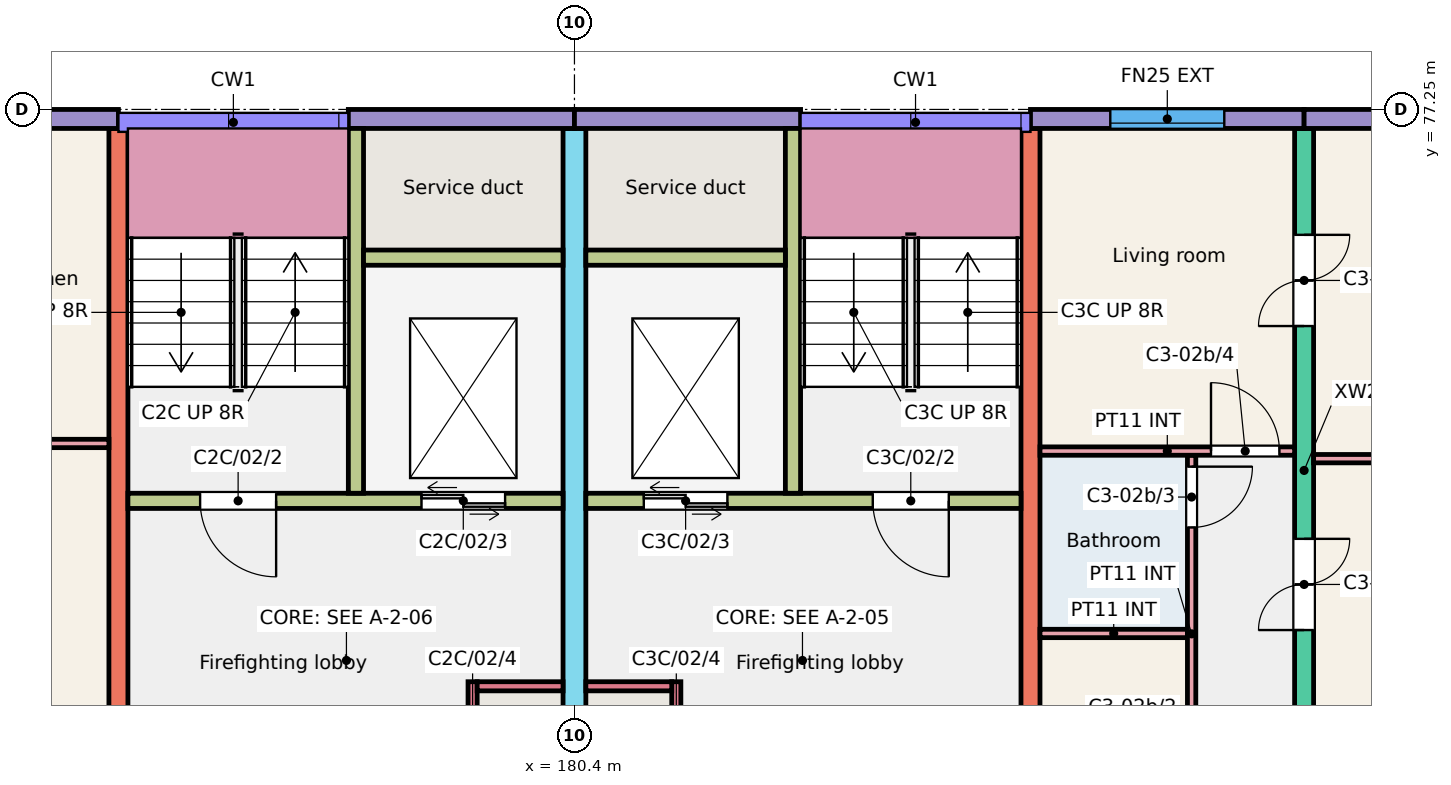
"""IFC4 building model, lengths in metres.
Left out: names, types, materials, properties, quantities, classifications, styles, units other than length and angle.
Written with IfcOpenShell. Run it as: python <this file> out.ifc"""

import sys

from ifc_helpers import new_model, si_unit, direction, frame, frame_2d, origin, place, context, subcontext, project, spatial, rectangle, extrude, element, fill, save


model = new_model("IFC4")
c1 = context("Model", 3, precision=1e-05, world=origin(), true_north=direction((0.0, 1.0)))
c2 = subcontext(c1, "Body", "Model", "MODEL_VIEW")
j1 = project(units=[si_unit("LENGTHUNIT", "METRE"), si_unit("PLANEANGLEUNIT", "RADIAN")], contexts=[c1])
p1 = place(None, origin())
s1 = spatial("IfcSite", under=j1, at=p1, CompositionType="ELEMENT")
p2 = place(p1, origin())
s2 = spatial("IfcBuilding", under=s1, at=p2, CompositionType="ELEMENT")
p3 = place(p2, frame((0.0, 0.0, 6.0)))
s3 = spatial("IfcBuildingStorey", under=s2, at=p3, CompositionType="ELEMENT", Elevation=6.0)
p4 = place(p3, frame((174.4, 68.0, 0.0), z_axis=(0.0, 0.0, 1.0), x_axis=(0.0, 1.0, 0.0)))
e1 = element("IfcWall", 1, at=p4, inside=s3, PredefinedType="SHEAR", context=c2, shape_type="SweptSolid", body=[
    extrude(rectangle(XDim=9.0, YDim=0.25, at=frame_2d((4.5, 0.0))), origin(), (0.0, 0.0, 1.0), 3.0),
])
p5 = place(p3, frame((180.4, 66.0, 0.0), z_axis=(0.0, 0.0, 1.0), x_axis=(0.0, 1.0, 0.0)))
e2 = element("IfcWall", 2, at=p5, inside=s3, PredefinedType="SHEAR", context=c2, shape_type="SweptSolid", body=[
    extrude(rectangle(XDim=11.0, YDim=0.3, at=frame_2d((5.5, 0.0))), origin(), (0.0, 0.0, 1.0), 3.0),
])
p6 = place(p5, frame((0.3, 0.0, 0.0)))
e3 = element("IfcOpeningElement", 3, at=p6, cuts=e2, PredefinedType="OPENING", context=c2, shape_type="SweptSolid", body=[
    extrude(rectangle(XDim=1.2, YDim=2.1, at=frame_2d((0.6, 1.05))), frame((0.0, 0.16, 0.0), z_axis=(0.0, -1.0, 0.0), x_axis=(1.0, 0.0, 0.0)), (0.0, 0.0, 1.0), 0.32),
])
p7 = place(p3, frame((186.4, 68.0, 0.0), z_axis=(0.0, 0.0, 1.0), x_axis=(0.0, 1.0, 0.0)))
e4 = element("IfcWall", 4, at=p7, inside=s3, PredefinedType="SHEAR", context=c2, shape_type="SweptSolid", body=[
    extrude(rectangle(XDim=9.0, YDim=0.25, at=frame_2d((4.5, 0.0))), origin(), (0.0, 0.0, 1.0), 3.0),
])
p8 = place(p3, frame((190.0, 68.0, 0.0), z_axis=(0.0, 0.0, 1.0), x_axis=(0.0, 1.0, 0.0)))
e5 = element("IfcWall", 5, at=p8, inside=s3, PredefinedType="SHEAR", context=c2, shape_type="SweptSolid", body=[
    extrude(rectangle(XDim=9.0, YDim=0.25, at=frame_2d((4.5, 0.0))), origin(), (0.0, 0.0, 1.0), 3.0),
])
p9 = place(p8, frame((2.4, 0.0, 0.0)))
e6 = element("IfcOpeningElement", 6, at=p9, cuts=e5, PredefinedType="OPENING", context=c2, shape_type="SweptSolid", body=[
    extrude(rectangle(XDim=1.2, YDim=2.1, at=frame_2d((0.6, 1.05))), frame((0.0, 0.135, 0.0), z_axis=(0.0, -1.0, 0.0), x_axis=(1.0, 0.0, 0.0)), (0.0, 0.0, 1.0), 0.27),
])
p10 = place(p8, frame((6.4, 0.0, 0.0)))
e7 = element("IfcOpeningElement", 7, at=p10, cuts=e5, PredefinedType="OPENING", context=c2, shape_type="SweptSolid", body=[
    extrude(rectangle(XDim=1.2, YDim=2.1, at=frame_2d((0.6, 1.05))), frame((0.0, 0.135, 0.0), z_axis=(0.0, -1.0, 0.0), x_axis=(1.0, 0.0, 0.0)), (0.0, 0.0, 1.0), 0.27),
])
p11 = place(p3, frame((170.8, 77.125, 0.0), z_axis=(0.0, 0.0, 1.0), x_axis=(1.0, 0.0, 0.0)))
e8 = element("IfcWall", 8, at=p11, inside=s3, PredefinedType="SOLIDWALL", context=c2, shape_type="SweptSolid", body=[
    extrude(rectangle(XDim=3.6, YDim=0.25, at=frame_2d((1.8, 0.0))), origin(), (0.0, 0.0, 1.0), 3.0),
])
p12 = place(p11, frame((1.188, 0.0, 1.1)))
e9 = element("IfcOpeningElement", 9, at=p12, cuts=e8, PredefinedType="OPENING", context=c2, shape_type="SweptSolid", body=[
    extrude(rectangle(XDim=1.2, YDim=1.3, at=frame_2d((0.6, 0.65))), frame((0.0, 0.135, 0.0), z_axis=(0.0, -1.0, 0.0), x_axis=(1.0, 0.0, 0.0)), (0.0, 0.0, 1.0), 0.27),
])
p13 = place(p3, frame((177.425, 77.125, 0.0), z_axis=(0.0, 0.0, 1.0), x_axis=(1.0, 0.0, 0.0)))
e10 = element("IfcWall", 10, at=p13, inside=s3, PredefinedType="SOLIDWALL", context=c2, shape_type="SweptSolid", body=[
    extrude(rectangle(XDim=2.975, YDim=0.25, at=frame_2d((1.487, 0.0))), origin(), (0.0, 0.0, 1.0), 3.0),
])
p14 = place(p3, frame((174.525, 72.1, 0.0), z_axis=(0.0, 0.0, 1.0), x_axis=(1.0, 0.0, 0.0)))
e11 = element("IfcWall", 11, at=p14, inside=s3, PredefinedType="SHEAR", context=c2, shape_type="SweptSolid", body=[
    extrude(rectangle(XDim=5.725, YDim=0.2, at=frame_2d((2.863, 0.0))), origin(), (0.0, 0.0, 1.0), 3.0),
])
p15 = place(p14, frame((0.95, 0.0, 0.0)))
e12 = element("IfcOpeningElement", 12, at=p15, cuts=e11, PredefinedType="OPENING", context=c2, shape_type="SweptSolid", body=[
    extrude(rectangle(XDim=1.0, YDim=2.1, at=frame_2d((0.5, 1.05))), frame((0.0, 0.11, 0.0), z_axis=(0.0, -1.0, 0.0), x_axis=(1.0, 0.0, 0.0)), (0.0, 0.0, 1.0), 0.22),
])
p16 = place(p14, frame((3.863, 0.0, 0.0)))
e13 = element("IfcOpeningElement", 13, at=p16, cuts=e11, PredefinedType="OPENING", context=c2, shape_type="SweptSolid", body=[
    extrude(rectangle(XDim=1.1, YDim=2.1, at=frame_2d((0.55, 1.05))), frame((0.0, 0.11, 0.0), z_axis=(0.0, -1.0, 0.0), x_axis=(1.0, 0.0, 0.0)), (0.0, 0.0, 1.0), 0.22),
])
p17 = place(p3, frame((177.525, 72.2, 0.0), z_axis=(0.0, 0.0, 1.0), x_axis=(0.0, 1.0, 0.0)))
e14 = element("IfcWall", 14, at=p17, inside=s3, PredefinedType="SHEAR", context=c2, shape_type="SweptSolid", body=[
    extrude(rectangle(XDim=4.8, YDim=0.2, at=frame_2d((2.4, 0.0))), origin(), (0.0, 0.0, 1.0), 3.0),
])
p18 = place(p3, frame((177.625, 75.3, 0.0), z_axis=(0.0, 0.0, 1.0), x_axis=(1.0, 0.0, 0.0)))
e15 = element("IfcWall", 15, at=p18, inside=s3, PredefinedType="SHEAR", context=c2, shape_type="SweptSolid", body=[
    extrude(rectangle(XDim=2.625, YDim=0.2, at=frame_2d((1.312, 0.0))), origin(), (0.0, 0.0, 1.0), 3.0),
])
p19 = place(p3, frame((179.06, 68.0, 0.0), z_axis=(0.0, 0.0, 1.0), x_axis=(0.0, 1.0, 0.0)))
e16 = element("IfcWall", 16, at=p19, inside=s3, PredefinedType="SHEAR", context=c2, shape_type="SweptSolid", body=[
    extrude(rectangle(XDim=1.72, YDim=0.12, at=frame_2d((0.86, 0.0))), origin(), (0.0, 0.0, 1.0), 3.0),
])
p20 = place(p19, frame((0.45, 0.0, 0.0)))
e17 = element("IfcOpeningElement", 17, at=p20, cuts=e16, PredefinedType="OPENING", context=c2, shape_type="SweptSolid", body=[
    extrude(rectangle(XDim=0.9, YDim=2.1, at=frame_2d((0.45, 1.05))), frame((0.0, 0.07, 0.0), z_axis=(0.0, -1.0, 0.0), x_axis=(1.0, 0.0, 0.0)), (0.0, 0.0, 1.0), 0.14),
])
p21 = place(p3, frame((179.12, 69.66, 0.0), z_axis=(0.0, 0.0, 1.0), x_axis=(1.0, 0.0, 0.0)))
e18 = element("IfcWall", 18, at=p21, inside=s3, PredefinedType="SHEAR", context=c2, shape_type="SweptSolid", body=[
    extrude(rectangle(XDim=1.13, YDim=0.12, at=frame_2d((0.565, 0.0))), origin(), (0.0, 0.0, 1.0), 3.0),
])
p22 = place(p3, frame((180.4, 77.125, 0.0), z_axis=(0.0, 0.0, 1.0), x_axis=(1.0, 0.0, 0.0)))
e19 = element("IfcWall", 19, at=p22, inside=s3, PredefinedType="SOLIDWALL", context=c2, shape_type="SweptSolid", body=[
    extrude(rectangle(XDim=2.975, YDim=0.25, at=frame_2d((1.488, 0.0))), origin(), (0.0, 0.0, 1.0), 3.0),
])
p23 = place(p3, frame((180.55, 72.1, 0.0), z_axis=(0.0, 0.0, 1.0), x_axis=(1.0, 0.0, 0.0)))
e20 = element("IfcWall", 20, at=p23, inside=s3, PredefinedType="SHEAR", context=c2, shape_type="SweptSolid", body=[
    extrude(rectangle(XDim=5.725, YDim=0.2, at=frame_2d((2.862, 0.0))), origin(), (0.0, 0.0, 1.0), 3.0),
])
p24 = place(p23, frame((3.775, 0.0, 0.0)))
e21 = element("IfcOpeningElement", 21, at=p24, cuts=e20, PredefinedType="OPENING", context=c2, shape_type="SweptSolid", body=[
    extrude(rectangle(XDim=1.0, YDim=2.1, at=frame_2d((0.5, 1.05))), frame((0.0, 0.11, 0.0), z_axis=(0.0, -1.0, 0.0), x_axis=(1.0, 0.0, 0.0)), (0.0, 0.0, 1.0), 0.22),
])
p25 = place(p23, frame((0.762, 0.0, 0.0)))
e22 = element("IfcOpeningElement", 22, at=p25, cuts=e20, PredefinedType="OPENING", context=c2, shape_type="SweptSolid", body=[
    extrude(rectangle(XDim=1.1, YDim=2.1, at=frame_2d((0.55, 1.05))), frame((0.0, 0.11, 0.0), z_axis=(0.0, -1.0, 0.0), x_axis=(1.0, 0.0, 0.0)), (0.0, 0.0, 1.0), 0.22),
])
p26 = place(p3, frame((183.275, 72.2, 0.0), z_axis=(0.0, 0.0, 1.0), x_axis=(0.0, 1.0, 0.0)))
e23 = element("IfcWall", 23, at=p26, inside=s3, PredefinedType="SHEAR", context=c2, shape_type="SweptSolid", body=[
    extrude(rectangle(XDim=4.8, YDim=0.2, at=frame_2d((2.4, 0.0))), origin(), (0.0, 0.0, 1.0), 3.0),
])
p27 = place(p3, frame((180.55, 75.3, 0.0), z_axis=(0.0, 0.0, 1.0), x_axis=(1.0, 0.0, 0.0)))
e24 = element("IfcWall", 24, at=p27, inside=s3, PredefinedType="SHEAR", context=c2, shape_type="SweptSolid", body=[
    extrude(rectangle(XDim=2.625, YDim=0.2, at=frame_2d((1.312, 0.0))), origin(), (0.0, 0.0, 1.0), 3.0),
])
p28 = place(p3, frame((181.74, 68.0, 0.0), z_axis=(0.0, 0.0, 1.0), x_axis=(0.0, 1.0, 0.0)))
e25 = element("IfcWall", 25, at=p28, inside=s3, PredefinedType="SHEAR", context=c2, shape_type="SweptSolid", body=[
    extrude(rectangle(XDim=1.72, YDim=0.12, at=frame_2d((0.86, 0.0))), origin(), (0.0, 0.0, 1.0), 3.0),
])
p29 = place(p28, frame((0.45, 0.0, 0.0)))
e26 = element("IfcOpeningElement", 26, at=p29, cuts=e25, PredefinedType="OPENING", context=c2, shape_type="SweptSolid", body=[
    extrude(rectangle(XDim=0.9, YDim=2.1, at=frame_2d((0.45, 1.05))), frame((0.0, 0.07, 0.0), z_axis=(0.0, -1.0, 0.0), x_axis=(1.0, 0.0, 0.0)), (0.0, 0.0, 1.0), 0.14),
])
p30 = place(p3, frame((180.55, 69.66, 0.0), z_axis=(0.0, 0.0, 1.0), x_axis=(1.0, 0.0, 0.0)))
e27 = element("IfcWall", 27, at=p30, inside=s3, PredefinedType="SHEAR", context=c2, shape_type="SweptSolid", body=[
    extrude(rectangle(XDim=1.13, YDim=0.12, at=frame_2d((0.565, 0.0))), origin(), (0.0, 0.0, 1.0), 3.0),
])
p31 = place(p3, frame((186.4, 77.125, 0.0), z_axis=(0.0, 0.0, 1.0), x_axis=(1.0, 0.0, 0.0)))
e28 = element("IfcWall", 28, at=p31, inside=s3, PredefinedType="SOLIDWALL", context=c2, shape_type="SweptSolid", body=[
    extrude(rectangle(XDim=3.6, YDim=0.25, at=frame_2d((1.8, 0.0))), origin(), (0.0, 0.0, 1.0), 3.0),
])
p32 = place(p31, frame((1.05, 0.0, 0.9)))
e29 = element("IfcOpeningElement", 29, at=p32, cuts=e28, PredefinedType="OPENING", context=c2, shape_type="SweptSolid", body=[
    extrude(rectangle(XDim=1.5, YDim=1.5, at=frame_2d((0.75, 0.75))), frame((0.0, 0.135, 0.0), z_axis=(0.0, -1.0, 0.0), x_axis=(1.0, 0.0, 0.0)), (0.0, 0.0, 1.0), 0.27),
])
p33 = place(p3, frame((190.0, 77.125, 0.0), z_axis=(0.0, 0.0, 1.0), x_axis=(1.0, 0.0, 0.0)))
e30 = element("IfcWall", 30, at=p33, inside=s3, PredefinedType="SOLIDWALL", context=c2, shape_type="SweptSolid", body=[
    extrude(rectangle(XDim=3.6, YDim=0.25, at=frame_2d((1.8, 0.0))), origin(), (0.0, 0.0, 1.0), 3.0),
])
p34 = place(p33, frame((1.05, 0.0, 0.9)))
e31 = element("IfcOpeningElement", 31, at=p34, cuts=e30, PredefinedType="OPENING", context=c2, shape_type="SweptSolid", body=[
    extrude(rectangle(XDim=1.5, YDim=1.5, at=frame_2d((0.75, 0.75))), frame((0.0, 0.135, 0.0), z_axis=(0.0, -1.0, 0.0), x_axis=(1.0, 0.0, 0.0)), (0.0, 0.0, 1.0), 0.27),
])
p35 = place(p3, frame((170.9, 72.855, 0.0), z_axis=(0.0, 0.0, 1.0), x_axis=(1.0, 0.0, 0.0)))
e32 = element("IfcWall", 32, at=p35, inside=s3, PredefinedType="PARTITIONING", context=c2, shape_type="SweptSolid", body=[
    extrude(rectangle(XDim=3.375, YDim=0.11, at=frame_2d((1.688, 0.0))), origin(), (0.0, 0.0, 1.0), 2.8),
])
p36 = place(p3, frame((186.525, 70.355, 0.0), z_axis=(0.0, 0.0, 1.0), x_axis=(1.0, 0.0, 0.0)))
e33 = element("IfcWall", 33, at=p36, inside=s3, PredefinedType="PARTITIONING", context=c2, shape_type="SweptSolid", body=[
    extrude(rectangle(XDim=1.94, YDim=0.11, at=frame_2d((0.97, 0.0))), origin(), (0.0, 0.0, 1.0), 2.8),
])
p37 = place(p3, frame((188.52, 68.0, 0.0), z_axis=(0.0, 0.0, 1.0), x_axis=(0.0, 1.0, 0.0)))
e34 = element("IfcWall", 34, at=p37, inside=s3, PredefinedType="PARTITIONING", context=c2, shape_type="SweptSolid", body=[
    extrude(rectangle(XDim=4.7, YDim=0.11, at=frame_2d((2.35, 0.0))), origin(), (0.0, 0.0, 1.0), 2.8),
])
p38 = place(p37, frame((0.2, 0.0, 0.0)))
e35 = element("IfcOpeningElement", 35, at=p38, cuts=e34, PredefinedType="OPENING", context=c2, shape_type="SweptSolid", body=[
    extrude(rectangle(XDim=0.8, YDim=2.1, at=frame_2d((0.4, 1.05))), frame((0.0, 0.065, 0.0), z_axis=(0.0, -1.0, 0.0), x_axis=(1.0, 0.0, 0.0)), (0.0, 0.0, 1.0), 0.13),
])
p39 = place(p37, frame((3.75, 0.0, 0.0)))
e36 = element("IfcOpeningElement", 36, at=p39, cuts=e34, PredefinedType="OPENING", context=c2, shape_type="SweptSolid", body=[
    extrude(rectangle(XDim=0.8, YDim=2.1, at=frame_2d((0.4, 1.05))), frame((0.0, 0.065, 0.0), z_axis=(0.0, -1.0, 0.0), x_axis=(1.0, 0.0, 0.0)), (0.0, 0.0, 1.0), 0.13),
])
p40 = place(p3, frame((186.525, 72.755, 0.0), z_axis=(0.0, 0.0, 1.0), x_axis=(1.0, 0.0, 0.0)))
e37 = element("IfcWall", 37, at=p40, inside=s3, PredefinedType="PARTITIONING", context=c2, shape_type="SweptSolid", body=[
    extrude(rectangle(XDim=3.35, YDim=0.11, at=frame_2d((1.675, 0.0))), origin(), (0.0, 0.0, 1.0), 2.8),
])
p41 = place(p40, frame((2.25, 0.0, 0.0)))
e38 = element("IfcOpeningElement", 38, at=p41, cuts=e37, PredefinedType="OPENING", context=c2, shape_type="SweptSolid", body=[
    extrude(rectangle(XDim=0.9, YDim=2.1, at=frame_2d((0.45, 1.05))), frame((0.0, 0.065, 0.0), z_axis=(0.0, -1.0, 0.0), x_axis=(1.0, 0.0, 0.0)), (0.0, 0.0, 1.0), 0.13),
])
p42 = place(p3, frame((190.125, 72.655, 0.0), z_axis=(0.0, 0.0, 1.0), x_axis=(1.0, 0.0, 0.0)))
e39 = element("IfcWall", 39, at=p42, inside=s3, PredefinedType="PARTITIONING", context=c2, shape_type="SweptSolid", body=[
    extrude(rectangle(XDim=3.35, YDim=0.11, at=frame_2d((1.675, 0.0))), origin(), (0.0, 0.0, 1.0), 2.8),
])
p43 = place(p32, origin())
e40 = element("IfcWindow", 40, at=p43, inside=s3, PartitioningType="SINGLE_PANEL", PredefinedType="WINDOW", context=c2, shape_type="SweptSolid", body=[
    extrude(rectangle(XDim=1.5, YDim=1.5, at=frame_2d((0.75, 0.75))), frame((0.0, -0.025, 0.0), z_axis=(0.0, -1.0, 0.0), x_axis=(1.0, 0.0, 0.0)), (0.0, 0.0, 1.0), 0.06),
])
fill(e29, e40)
p44 = place(p39, origin())
e41 = element("IfcDoor", 41, at=p44, inside=s3, OperationType="SINGLE_SWING_RIGHT", PredefinedType="DOOR", context=c2, shape_type="SweptSolid", body=[
    extrude(rectangle(XDim=0.8, YDim=2.1, at=frame_2d((0.4, 1.05))), frame((0.0, 0.025, 0.0), z_axis=(0.0, -1.0, 0.0), x_axis=(1.0, 0.0, 0.0)), (0.0, 0.0, 1.0), 0.05),
])
fill(e36, e41)
p45 = place(p41, origin())
e42 = element("IfcDoor", 42, at=p45, inside=s3, OperationType="SINGLE_SWING_LEFT", PredefinedType="DOOR", context=c2, shape_type="SweptSolid", body=[
    extrude(rectangle(XDim=0.9, YDim=2.1, at=frame_2d((0.45, 1.05))), frame((0.0, 0.025, 0.0), z_axis=(0.0, -1.0, 0.0), x_axis=(1.0, 0.0, 0.0)), (0.0, 0.0, 1.0), 0.05),
])
fill(e38, e42)
p46 = place(p9, origin())
e43 = element("IfcDoor", 43, at=p46, inside=s3, OperationType="DOUBLE_DOOR_SINGLE_SWING", PredefinedType="DOOR", context=c2, shape_type="SweptSolid", body=[
    extrude(rectangle(XDim=1.2, YDim=2.1, at=frame_2d((0.6, 1.05))), frame((0.0, 0.025, 0.0), z_axis=(0.0, -1.0, 0.0), x_axis=(1.0, 0.0, 0.0)), (0.0, 0.0, 1.0), 0.05),
])
fill(e6, e43)
p47 = place(p10, origin())
e44 = element("IfcDoor", 44, at=p47, inside=s3, OperationType="DOUBLE_DOOR_SINGLE_SWING", PredefinedType="DOOR", context=c2, shape_type="SweptSolid", body=[
    extrude(rectangle(XDim=1.2, YDim=2.1, at=frame_2d((0.6, 1.05))), frame((0.0, 0.025, 0.0), z_axis=(0.0, -1.0, 0.0), x_axis=(1.0, 0.0, 0.0)), (0.0, 0.0, 1.0), 0.05),
])
fill(e7, e44)
p48 = place(p15, origin())
e45 = element("IfcDoor", 45, at=p48, inside=s3, OperationType="SINGLE_SWING_RIGHT", PredefinedType="DOOR", context=c2, shape_type="SweptSolid", body=[
    extrude(rectangle(XDim=1.0, YDim=2.1, at=frame_2d((0.5, 1.05))), frame((0.0, 0.025, 0.0), z_axis=(0.0, -1.0, 0.0), x_axis=(1.0, 0.0, 0.0)), (0.0, 0.0, 1.0), 0.05),
])
fill(e12, e45)
p49 = place(p16, origin())
e46 = element("IfcDoor", 46, at=p49, inside=s3, OperationType="DOUBLE_DOOR_SLIDING", PredefinedType="DOOR", context=c2, shape_type="SweptSolid", body=[
    extrude(rectangle(XDim=1.1, YDim=2.1, at=frame_2d((0.55, 1.05))), frame((0.0, 0.025, 0.0), z_axis=(0.0, -1.0, 0.0), x_axis=(1.0, 0.0, 0.0)), (0.0, 0.0, 1.0), 0.05),
])
fill(e13, e46)
p50 = place(p24, origin())
e47 = element("IfcDoor", 47, at=p50, inside=s3, OperationType="SINGLE_SWING_RIGHT", PredefinedType="DOOR", context=c2, shape_type="SweptSolid", body=[
    extrude(rectangle(XDim=1.0, YDim=2.1, at=frame_2d((0.5, 1.05))), frame((0.0, 0.025, 0.0), z_axis=(0.0, -1.0, 0.0), x_axis=(1.0, 0.0, 0.0)), (0.0, 0.0, 1.0), 0.05),
])
fill(e21, e47)
p51 = place(p25, origin())
e48 = element("IfcDoor", 48, at=p51, inside=s3, OperationType="DOUBLE_DOOR_SLIDING", PredefinedType="DOOR", context=c2, shape_type="SweptSolid", body=[
    extrude(rectangle(XDim=1.1, YDim=2.1, at=frame_2d((0.55, 1.05))), frame((0.0, 0.025, 0.0), z_axis=(0.0, -1.0, 0.0), x_axis=(1.0, 0.0, 0.0)), (0.0, 0.0, 1.0), 0.05),
])
fill(e22, e48)
save(model, sys.argv[1])
